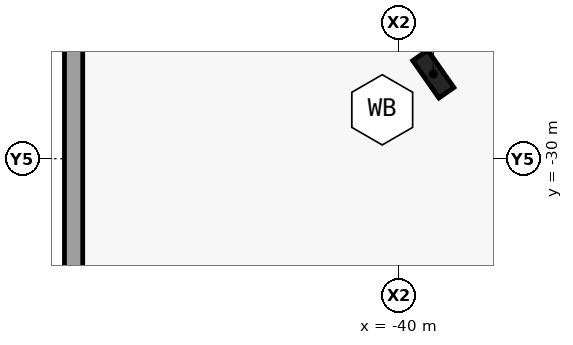
"""IFC4 building model, lengths in metres.
Left out: names, types, materials, properties, quantities, classifications, styles, units other than length and angle.
Written with IfcOpenShell. Run it as: python <this file> out.ifc"""

import sys

from ifc_helpers import new_model, si_unit, direction, frame, origin, origin_2d, place, context, subcontext, project, spatial, polyline, rectangle, outline, extrude, element, save


model = new_model("IFC4")
c1 = context("Model", 3, precision=1e-05, world=origin(), true_north=direction((0.0, 1.0)))
c2 = subcontext(c1, "Body", "Model", "MODEL_VIEW")
j1 = project(units=[si_unit("LENGTHUNIT", "METRE"), si_unit("PLANEANGLEUNIT", "RADIAN")], contexts=[c1])
p1 = place(None, origin())
s1 = spatial("IfcSite", under=j1, at=p1, CompositionType="ELEMENT")
p2 = place(p1, origin())
s2 = spatial("IfcBuilding", under=s1, at=p2, CompositionType="ELEMENT")
p3 = place(p2, frame((0.0, 0.0, -4.5)))
s3 = spatial("IfcBuildingStorey", under=s2, at=p3, CompositionType="ELEMENT", Elevation=-4.5)
p4 = place(p3, frame((-50.7, -1.0, 0.0), z_axis=(0.0, 0.0, 1.0), x_axis=(0.0, -1.0, 0.0)))
e1 = element("IfcWall", 1, at=p4, inside=s3, PredefinedType="SOLIDWALL", context=c2, shape_type="SweptSolid", body=[
    extrude(outline(polyline([(81.4, 0.3), (81.4, -0.3), (0.6, -0.3), (0.6, 0.3), (81.4, 0.3)])), origin(), (0.0, 0.0, 1.0), 4.5),
])
p5 = place(p3, frame((-38.869, -27.216, 0.0), z_axis=(0.0, 0.0, 1.0), x_axis=(-0.573576436351, 0.819152044289, 0.0)))
e2 = element("IfcColumn", 2, at=p5, inside=s3, PredefinedType="COLUMN", context=c2, shape_type="SweptSolid", body=[
    extrude(rectangle(XDim=1.5, YDim=0.6, at=origin_2d()), origin(), (0.0, 0.0, 1.0), 4.5),
])
save(model, sys.argv[1])
